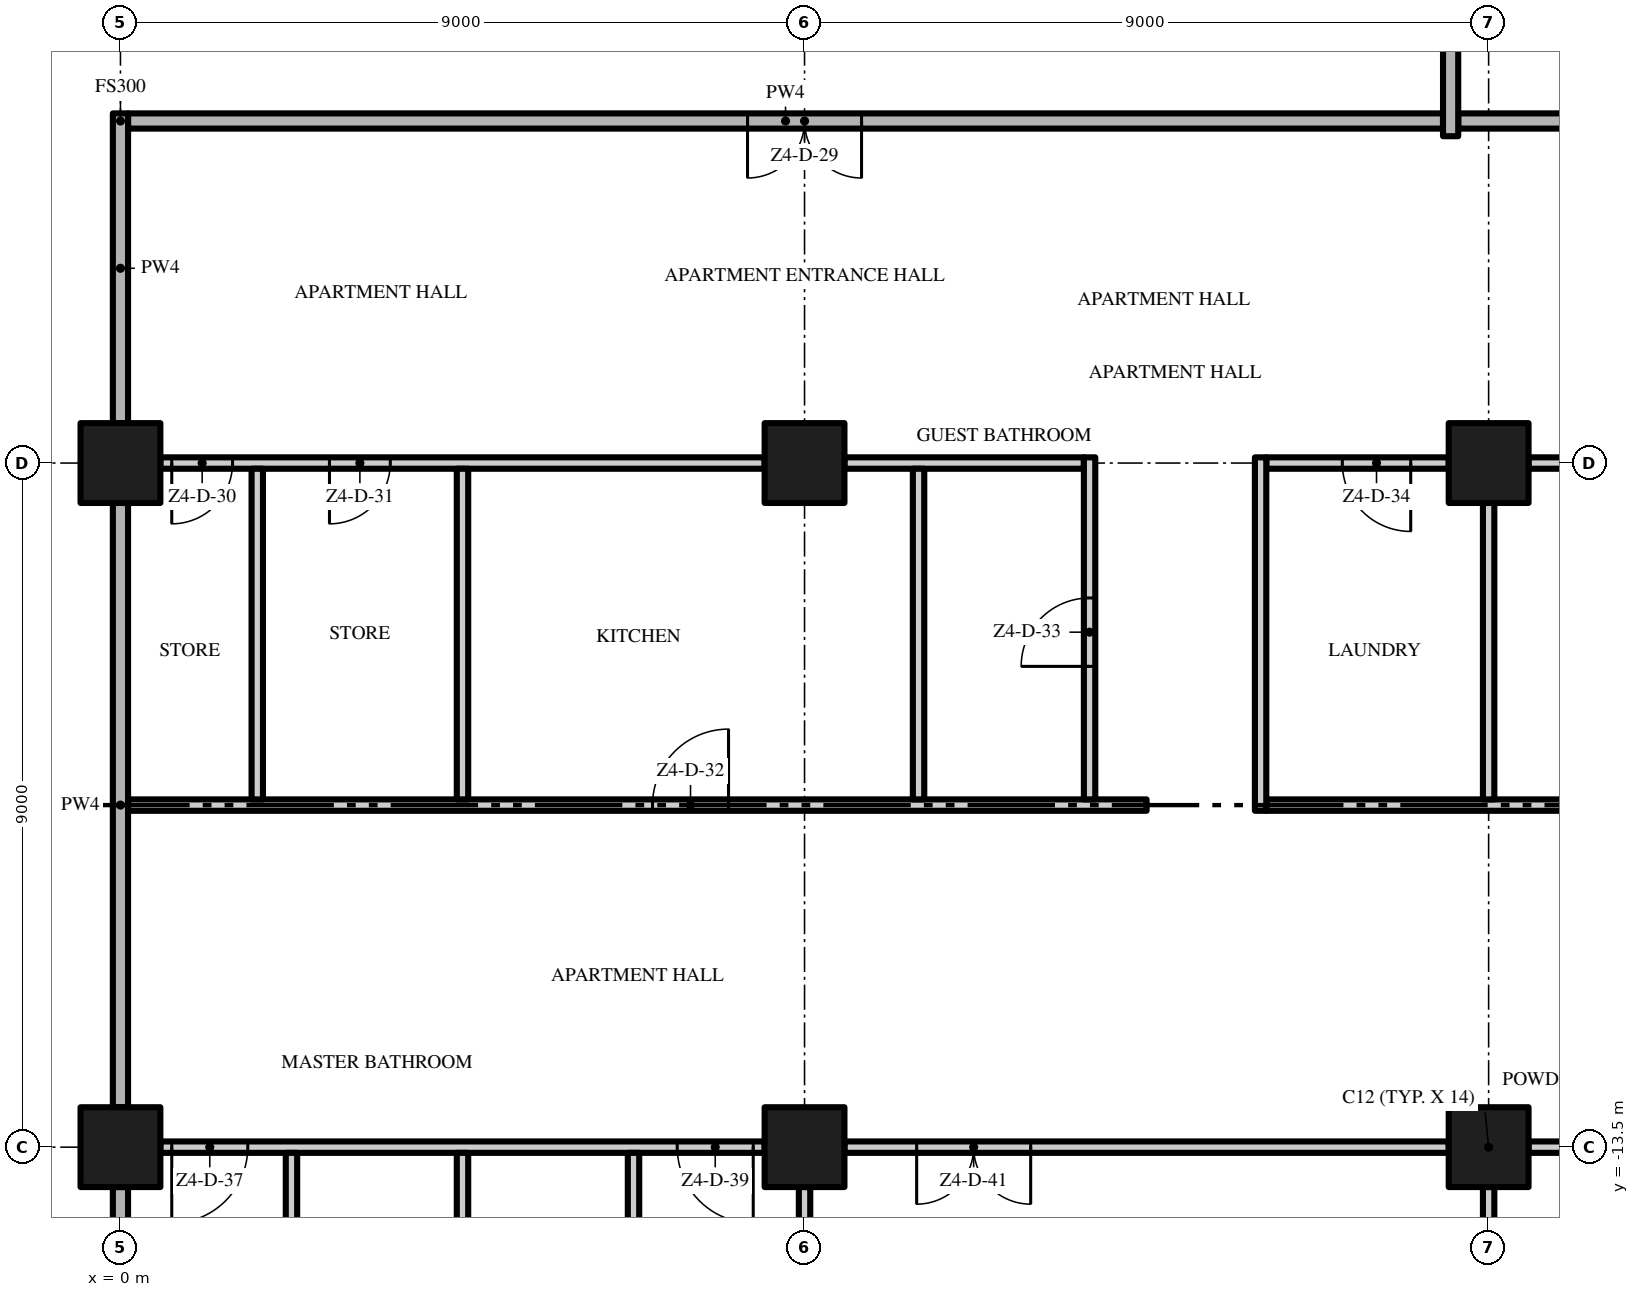
"""IFC4 building model, lengths in metres.
Left out: names, types, materials, properties, quantities, classifications, styles, units other than length and angle.
Written with IfcOpenShell. Run it as: python <this file> out.ifc"""

import sys

from ifc_helpers import new_model, si_unit, direction, frame, frame_2d, origin, origin_2d, place, context, subcontext, project, spatial, rectangle, extrude, element, fill, save


model = new_model("IFC4")
c1 = context("Model", 3, precision=1e-05, world=origin(), true_north=direction((0.0, 1.0)))
c2 = subcontext(c1, "Body", "Model", "MODEL_VIEW")
j1 = project(units=[si_unit("LENGTHUNIT", "METRE"), si_unit("PLANEANGLEUNIT", "RADIAN")], contexts=[c1])
p1 = place(None, origin())
s1 = spatial("IfcSite", under=j1, at=p1, CompositionType="ELEMENT")
p2 = place(p1, origin())
s2 = spatial("IfcBuilding", under=s1, at=p2, CompositionType="ELEMENT")
p3 = place(p2, frame((0.0, 0.0, 222.4)))
s3 = spatial("IfcBuildingStorey", under=s2, at=p3, CompositionType="ELEMENT", Elevation=222.4)
for number, where, z_axis, x_axis in (
    (1, (0.0, -13.5, 0.0), (0.0, 0.0, 1.0), (1.0, 0.0, 0.0)),
    (2, (0.0, -4.5, 0.0), (0.0, 0.0, 1.0), (1.0, 0.0, 0.0)),
    (3, (18.0, -13.5, 0.0), (0.0, 0.0, 1.0), (1.0, 0.0, 0.0)),
    (4, (18.0, -4.5, 0.0), (0.0, 0.0, 1.0), (1.0, 0.0, 0.0)),
    (5, (9.0, -13.5, 0.0), (0.0, 0.0, 1.0), (1.0, 0.0, 0.0)),
    (6, (9.0, -4.5, 0.0), (0.0, 0.0, 1.0), (1.0, 0.0, 0.0)),
):
    element("IfcColumn", number, at=place(p3, frame(where, z_axis=z_axis, x_axis=x_axis)), inside=s3, PredefinedType="COLUMN", context=c2, shape_type="SweptSolid", body=[
        extrude(rectangle(XDim=1.05, YDim=1.05, at=origin_2d()), origin(), (0.0, 0.0, 1.0), 3.5),
    ])
p4 = place(p3, frame((8.475, -13.5, 0.0), z_axis=(0.0, 0.0, 1.0), x_axis=(-1.0, 0.0, 0.0)))
e7 = element("IfcWall", 7, at=p4, inside=s3, PredefinedType="PARTITIONING", context=c2, shape_type="SweptSolid", body=[
    extrude(rectangle(XDim=7.95, YDim=0.15, at=frame_2d((3.975, 0.0))), origin(), (0.0, 0.0, 1.0), 3.5),
])
p5 = place(p4, frame((6.8, 0.0, 0.0)))
e8 = element("IfcOpeningElement", 8, at=p5, cuts=e7, PredefinedType="OPENING", context=c2, shape_type="SweptSolid", body=[
    extrude(rectangle(XDim=1.0, YDim=2.4, at=frame_2d((0.5, 1.2))), frame((0.0, 0.085, 0.0), z_axis=(0.0, -1.0, 0.0), x_axis=(1.0, 0.0, 0.0)), (0.0, 0.0, 1.0), 0.17),
])
p6 = place(p4, frame((0.15, 0.0, 0.0)))
e9 = element("IfcOpeningElement", 9, at=p6, cuts=e7, PredefinedType="OPENING", context=c2, shape_type="SweptSolid", body=[
    extrude(rectangle(XDim=1.0, YDim=2.4, at=frame_2d((0.5, 1.2))), frame((0.0, 0.085, 0.0), z_axis=(0.0, -1.0, 0.0), x_axis=(1.0, 0.0, 0.0)), (0.0, 0.0, 1.0), 0.17),
])
p7 = place(p3, frame((17.475, -13.5, 0.0), z_axis=(0.0, 0.0, 1.0), x_axis=(-1.0, 0.0, 0.0)))
e10 = element("IfcWall", 10, at=p7, inside=s3, PredefinedType="PARTITIONING", context=c2, shape_type="SweptSolid", body=[
    extrude(rectangle(XDim=7.95, YDim=0.15, at=frame_2d((3.975, 0.0))), origin(), (0.0, 0.0, 1.0), 3.5),
])
p8 = place(p7, frame((5.5, 0.0, 0.0)))
e11 = element("IfcOpeningElement", 11, at=p8, cuts=e10, PredefinedType="OPENING", context=c2, shape_type="SweptSolid", body=[
    extrude(rectangle(XDim=1.5, YDim=2.4, at=frame_2d((0.75, 1.2))), frame((0.0, 0.085, 0.0), z_axis=(0.0, -1.0, 0.0), x_axis=(1.0, 0.0, 0.0)), (0.0, 0.0, 1.0), 0.17),
])
p9 = place(p3, frame((26.05, -13.5, 0.0), z_axis=(0.0, 0.0, 1.0), x_axis=(-1.0, 0.0, 0.0)))
e12 = element("IfcWall", 12, at=p9, inside=s3, PredefinedType="PARTITIONING", context=c2, shape_type="SweptSolid", body=[
    extrude(rectangle(XDim=7.525, YDim=0.15, at=frame_2d((3.763, 0.0))), origin(), (0.0, 0.0, 1.0), 3.5),
])
p10 = place(p9, frame((1.55, 0.0, 0.0)))
e13 = element("IfcOpeningElement", 13, at=p10, cuts=e12, PredefinedType="OPENING", context=c2, shape_type="SweptSolid", body=[
    extrude(rectangle(XDim=1.8, YDim=2.4, at=frame_2d((0.9, 1.2))), frame((0.0, 0.085, 0.0), z_axis=(0.0, -1.0, 0.0), x_axis=(1.0, 0.0, 0.0)), (0.0, 0.0, 1.0), 0.17),
])
p11 = place(p3, frame((0.1, -9.0, 0.0), z_axis=(0.0, 0.0, 1.0), x_axis=(1.0, 0.0, 0.0)))
e14 = element("IfcWall", 14, at=p11, inside=s3, PredefinedType="PARTITIONING", context=c2, shape_type="SweptSolid", body=[
    extrude(rectangle(XDim=13.4, YDim=0.15, at=frame_2d((6.7, 0.0))), origin(), (0.0, 0.0, 1.0), 3.5),
])
p12 = place(p11, frame((6.9, 0.0, 0.0)))
e15 = element("IfcOpeningElement", 15, at=p12, cuts=e14, PredefinedType="OPENING", context=c2, shape_type="SweptSolid", body=[
    extrude(rectangle(XDim=1.0, YDim=2.4, at=frame_2d((0.5, 1.2))), frame((0.0, 0.085, 0.0), z_axis=(0.0, -1.0, 0.0), x_axis=(1.0, 0.0, 0.0)), (0.0, 0.0, 1.0), 0.17),
])
p13 = place(p3, frame((15.075, -9.0, 0.0), z_axis=(0.0, 0.0, 1.0), x_axis=(1.0, 0.0, 0.0)))
e16 = element("IfcWall", 16, at=p13, inside=s3, PredefinedType="PARTITIONING", context=c2, shape_type="SweptSolid", body=[
    extrude(rectangle(XDim=11.625, YDim=0.15, at=frame_2d((5.812, 0.0))), origin(), (0.0, 0.0, 1.0), 3.5),
])
p14 = place(p3, frame((8.475, -4.5, 0.0), z_axis=(0.0, 0.0, 1.0), x_axis=(-1.0, 0.0, 0.0)))
e17 = element("IfcWall", 17, at=p14, inside=s3, PredefinedType="PARTITIONING", context=c2, shape_type="SweptSolid", body=[
    extrude(rectangle(XDim=7.95, YDim=0.15, at=frame_2d((3.975, 0.0))), origin(), (0.0, 0.0, 1.0), 3.5),
])
p15 = place(p14, frame((7.0, 0.0, 0.0)))
e18 = element("IfcOpeningElement", 18, at=p15, cuts=e17, PredefinedType="OPENING", context=c2, shape_type="SweptSolid", body=[
    extrude(rectangle(XDim=0.8, YDim=2.0, at=frame_2d((0.4, 1.0))), frame((0.0, 0.085, 0.0), z_axis=(0.0, -1.0, 0.0), x_axis=(1.0, 0.0, 0.0)), (0.0, 0.0, 1.0), 0.17),
])
p16 = place(p14, frame((4.925, 0.0, 0.0)))
e19 = element("IfcOpeningElement", 19, at=p16, cuts=e17, PredefinedType="OPENING", context=c2, shape_type="SweptSolid", body=[
    extrude(rectangle(XDim=0.8, YDim=2.0, at=frame_2d((0.4, 1.0))), frame((0.0, 0.085, 0.0), z_axis=(0.0, -1.0, 0.0), x_axis=(1.0, 0.0, 0.0)), (0.0, 0.0, 1.0), 0.17),
])
p17 = place(p3, frame((9.525, -4.5, 0.0), z_axis=(0.0, 0.0, 1.0), x_axis=(1.0, 0.0, 0.0)))
e20 = element("IfcWall", 20, at=p17, inside=s3, PredefinedType="PARTITIONING", context=c2, shape_type="SweptSolid", body=[
    extrude(rectangle(XDim=3.15, YDim=0.15, at=frame_2d((1.575, 0.0))), origin(), (0.0, 0.0, 1.0), 3.5),
])
p18 = place(p3, frame((17.475, -4.5, 0.0), z_axis=(0.0, 0.0, 1.0), x_axis=(-1.0, 0.0, 0.0)))
e21 = element("IfcWall", 21, at=p18, inside=s3, PredefinedType="PARTITIONING", context=c2, shape_type="SweptSolid", body=[
    extrude(rectangle(XDim=2.4, YDim=0.15, at=frame_2d((1.2, 0.0))), origin(), (0.0, 0.0, 1.0), 3.5),
])
p19 = place(p18, frame((0.5, 0.0, 0.0)))
e22 = element("IfcOpeningElement", 22, at=p19, cuts=e21, PredefinedType="OPENING", context=c2, shape_type="SweptSolid", body=[
    extrude(rectangle(XDim=0.9, YDim=2.1, at=frame_2d((0.45, 1.05))), frame((0.0, 0.085, 0.0), z_axis=(0.0, -1.0, 0.0), x_axis=(1.0, 0.0, 0.0)), (0.0, 0.0, 1.0), 0.17),
])
p20 = place(p3, frame((26.05, -4.5, 0.0), z_axis=(0.0, 0.0, 1.0), x_axis=(-1.0, 0.0, 0.0)))
e23 = element("IfcWall", 23, at=p20, inside=s3, PredefinedType="PARTITIONING", context=c2, shape_type="SweptSolid", body=[
    extrude(rectangle(XDim=7.525, YDim=0.15, at=frame_2d((3.763, 0.0))), origin(), (0.0, 0.0, 1.0), 3.5),
])
p21 = place(p20, frame((4.975, 0.0, 0.0)))
e24 = element("IfcOpeningElement", 24, at=p21, cuts=e23, PredefinedType="OPENING", context=c2, shape_type="SweptSolid", body=[
    extrude(rectangle(XDim=0.9, YDim=2.1, at=frame_2d((0.45, 1.05))), frame((0.0, 0.085, 0.0), z_axis=(0.0, -1.0, 0.0), x_axis=(1.0, 0.0, 0.0)), (0.0, 0.0, 1.0), 0.17),
])
p22 = place(p3, frame((17.4, 0.0, 0.0), z_axis=(0.0, 0.0, 1.0), x_axis=(-1.0, 0.0, 0.0)))
e25 = element("IfcWall", 25, at=p22, inside=s3, PredefinedType="PARTITIONING", context=c2, shape_type="SweptSolid", body=[
    extrude(rectangle(XDim=17.3, YDim=0.2, at=frame_2d((8.65, 0.0))), origin(), (0.0, 0.0, 1.0), 3.5),
])
p23 = place(p22, frame((7.65, 0.0, 0.0)))
e26 = element("IfcOpeningElement", 26, at=p23, cuts=e25, PredefinedType="OPENING", context=c2, shape_type="SweptSolid", body=[
    extrude(rectangle(XDim=1.5, YDim=2.4, at=frame_2d((0.75, 1.2))), frame((0.0, 0.11, 0.0), z_axis=(0.0, -1.0, 0.0), x_axis=(1.0, 0.0, 0.0)), (0.0, 0.0, 1.0), 0.22),
])
p24 = place(p3, frame((17.6, 0.0, 0.0), z_axis=(0.0, 0.0, 1.0), x_axis=(1.0, 0.0, 0.0)))
e27 = element("IfcWall", 27, at=p24, inside=s3, PredefinedType="PARTITIONING", context=c2, shape_type="SweptSolid", body=[
    extrude(rectangle(XDim=9.1, YDim=0.2, at=frame_2d((4.55, 0.0))), origin(), (0.0, 0.0, 1.0), 3.5),
])
p25 = place(p3, frame((0.0, -21.55, 0.0), z_axis=(0.0, 0.0, 1.0), x_axis=(0.0, 1.0, 0.0)))
e28 = element("IfcWall", 28, at=p25, inside=s3, PredefinedType="PARTITIONING", context=c2, shape_type="SweptSolid", body=[
    extrude(rectangle(XDim=7.525, YDim=0.2, at=frame_2d((3.763, 0.0))), origin(), (0.0, 0.0, 1.0), 3.5),
])
p26 = place(p3, frame((0.0, -12.975, 0.0), z_axis=(0.0, 0.0, 1.0), x_axis=(0.0, 1.0, 0.0)))
e29 = element("IfcWall", 29, at=p26, inside=s3, PredefinedType="PARTITIONING", context=c2, shape_type="SweptSolid", body=[
    extrude(rectangle(XDim=7.95, YDim=0.2, at=frame_2d((3.975, 0.0))), origin(), (0.0, 0.0, 1.0), 3.5),
])
p27 = place(p3, frame((0.0, -3.975, 0.0), z_axis=(0.0, 0.0, 1.0), x_axis=(0.0, 1.0, 0.0)))
e30 = element("IfcWall", 30, at=p27, inside=s3, PredefinedType="PARTITIONING", context=c2, shape_type="SweptSolid", body=[
    extrude(rectangle(XDim=4.075, YDim=0.2, at=frame_2d((2.038, 0.0))), origin(), (0.0, 0.0, 1.0), 3.5),
])
p28 = place(p3, frame((1.8, -8.925, 0.0), z_axis=(0.0, 0.0, 1.0), x_axis=(0.0, 1.0, 0.0)))
e31 = element("IfcWall", 31, at=p28, inside=s3, PredefinedType="PARTITIONING", context=c2, shape_type="SweptSolid", body=[
    extrude(rectangle(XDim=4.35, YDim=0.15, at=frame_2d((2.175, 0.0))), origin(), (0.0, 0.0, 1.0), 3.5),
])
p29 = place(p3, frame((2.25, -16.575, 0.0), z_axis=(0.0, 0.0, 1.0), x_axis=(0.0, 1.0, 0.0)))
e32 = element("IfcWall", 32, at=p29, inside=s3, PredefinedType="PARTITIONING", context=c2, shape_type="SweptSolid", body=[
    extrude(rectangle(XDim=3.0, YDim=0.15, at=frame_2d((1.5, 0.0))), origin(), (0.0, 0.0, 1.0), 3.5),
])
p30 = place(p3, frame((4.5, -22.2, 0.0), z_axis=(0.0, 0.0, 1.0), x_axis=(0.0, 1.0, 0.0)))
e33 = element("IfcWall", 33, at=p30, inside=s3, PredefinedType="PARTITIONING", context=c2, shape_type="SweptSolid", body=[
    extrude(rectangle(XDim=8.625, YDim=0.15, at=frame_2d((4.312, 0.0))), origin(), (0.0, 0.0, 1.0), 3.5),
])
p31 = place(p3, frame((4.5, -8.925, 0.0), z_axis=(0.0, 0.0, 1.0), x_axis=(0.0, 1.0, 0.0)))
e34 = element("IfcWall", 34, at=p31, inside=s3, PredefinedType="PARTITIONING", context=c2, shape_type="SweptSolid", body=[
    extrude(rectangle(XDim=4.35, YDim=0.15, at=frame_2d((2.175, 0.0))), origin(), (0.0, 0.0, 1.0), 3.5),
])
p32 = place(p3, frame((6.75, -16.575, 0.0), z_axis=(0.0, 0.0, 1.0), x_axis=(0.0, 1.0, 0.0)))
e35 = element("IfcWall", 35, at=p32, inside=s3, PredefinedType="PARTITIONING", context=c2, shape_type="SweptSolid", body=[
    extrude(rectangle(XDim=3.0, YDim=0.15, at=frame_2d((1.5, 0.0))), origin(), (0.0, 0.0, 1.0), 3.5),
])
p33 = place(p3, frame((9.0, -21.55, 0.0), z_axis=(0.0, 0.0, 1.0), x_axis=(0.0, 1.0, 0.0)))
e36 = element("IfcWall", 36, at=p33, inside=s3, PredefinedType="PARTITIONING", context=c2, shape_type="SweptSolid", body=[
    extrude(rectangle(XDim=7.525, YDim=0.15, at=frame_2d((3.763, 0.0))), origin(), (0.0, 0.0, 1.0), 3.5),
])
p34 = place(p3, frame((10.5, -8.925, 0.0), z_axis=(0.0, 0.0, 1.0), x_axis=(0.0, 1.0, 0.0)))
e37 = element("IfcWall", 37, at=p34, inside=s3, PredefinedType="PARTITIONING", context=c2, shape_type="SweptSolid", body=[
    extrude(rectangle(XDim=4.35, YDim=0.15, at=frame_2d((2.175, 0.0))), origin(), (0.0, 0.0, 1.0), 3.5),
])
p35 = place(p3, frame((12.75, -8.925, 0.0), z_axis=(0.0, 0.0, 1.0), x_axis=(0.0, 1.0, 0.0)))
e38 = element("IfcWall", 38, at=p35, inside=s3, PredefinedType="PARTITIONING", context=c2, shape_type="SweptSolid", body=[
    extrude(rectangle(XDim=4.5, YDim=0.15, at=frame_2d((2.25, 0.0))), origin(), (0.0, 0.0, 1.0), 3.5),
])
p36 = place(p35, frame((1.75, 0.0, 0.0)))
e39 = element("IfcOpeningElement", 39, at=p36, cuts=e38, PredefinedType="OPENING", context=c2, shape_type="SweptSolid", body=[
    extrude(rectangle(XDim=0.9, YDim=2.1, at=frame_2d((0.45, 1.05))), frame((0.0, 0.085, 0.0), z_axis=(0.0, -1.0, 0.0), x_axis=(1.0, 0.0, 0.0)), (0.0, 0.0, 1.0), 0.17),
])
p37 = place(p3, frame((15.0, -9.075, 0.0), z_axis=(0.0, 0.0, 1.0), x_axis=(0.0, 1.0, 0.0)))
e40 = element("IfcWall", 40, at=p37, inside=s3, PredefinedType="PARTITIONING", context=c2, shape_type="SweptSolid", body=[
    extrude(rectangle(XDim=4.65, YDim=0.15, at=frame_2d((2.325, 0.0))), origin(), (0.0, 0.0, 1.0), 3.5),
])
p38 = place(p3, frame((17.5, -0.2, 0.0), z_axis=(0.0, 0.0, 1.0), x_axis=(0.0, 1.0, 0.0)))
e41 = element("IfcWall", 41, at=p38, inside=s3, PredefinedType="PARTITIONING", context=c2, shape_type="SweptSolid", body=[
    extrude(rectangle(XDim=4.175, YDim=0.2, at=frame_2d((2.087, 0.0))), origin(), (0.0, 0.0, 1.0), 3.5),
])
p39 = place(p3, frame((18.0, -21.55, 0.0), z_axis=(0.0, 0.0, 1.0), x_axis=(0.0, 1.0, 0.0)))
e42 = element("IfcWall", 42, at=p39, inside=s3, PredefinedType="PARTITIONING", context=c2, shape_type="SweptSolid", body=[
    extrude(rectangle(XDim=7.525, YDim=0.15, at=frame_2d((3.763, 0.0))), origin(), (0.0, 0.0, 1.0), 3.5),
])
p40 = place(p3, frame((18.0, -8.925, 0.0), z_axis=(0.0, 0.0, 1.0), x_axis=(0.0, 1.0, 0.0)))
e43 = element("IfcWall", 43, at=p40, inside=s3, PredefinedType="PARTITIONING", context=c2, shape_type="SweptSolid", body=[
    extrude(rectangle(XDim=3.9, YDim=0.15, at=frame_2d((1.95, 0.0))), origin(), (0.0, 0.0, 1.0), 3.5),
])
p41 = place(p23, origin())
e44 = element("IfcDoor", 44, at=p41, inside=s3, OperationType="DOUBLE_DOOR_SINGLE_SWING", PredefinedType="DOOR", context=c2, shape_type="SweptSolid", body=[
    extrude(rectangle(XDim=1.5, YDim=2.4, at=frame_2d((0.75, 1.2))), frame((0.0, 0.025, 0.0), z_axis=(0.0, -1.0, 0.0), x_axis=(1.0, 0.0, 0.0)), (0.0, 0.0, 1.0), 0.05),
])
fill(e26, e44)
p42 = place(p15, origin())
e45 = element("IfcDoor", 45, at=p42, inside=s3, OperationType="SINGLE_SWING_RIGHT", PredefinedType="DOOR", context=c2, shape_type="SweptSolid", body=[
    extrude(rectangle(XDim=0.8, YDim=2.0, at=frame_2d((0.4, 1.0))), frame((0.0, 0.025, 0.0), z_axis=(0.0, -1.0, 0.0), x_axis=(1.0, 0.0, 0.0)), (0.0, 0.0, 1.0), 0.05),
])
fill(e18, e45)
p43 = place(p16, origin())
e46 = element("IfcDoor", 46, at=p43, inside=s3, OperationType="SINGLE_SWING_RIGHT", PredefinedType="DOOR", context=c2, shape_type="SweptSolid", body=[
    extrude(rectangle(XDim=0.8, YDim=2.0, at=frame_2d((0.4, 1.0))), frame((0.0, 0.025, 0.0), z_axis=(0.0, -1.0, 0.0), x_axis=(1.0, 0.0, 0.0)), (0.0, 0.0, 1.0), 0.05),
])
fill(e19, e46)
p44 = place(p12, origin())
e47 = element("IfcDoor", 47, at=p44, inside=s3, OperationType="SINGLE_SWING_RIGHT", PredefinedType="DOOR", context=c2, shape_type="SweptSolid", body=[
    extrude(rectangle(XDim=1.0, YDim=2.4, at=frame_2d((0.5, 1.2))), frame((0.0, 0.025, 0.0), z_axis=(0.0, -1.0, 0.0), x_axis=(1.0, 0.0, 0.0)), (0.0, 0.0, 1.0), 0.05),
])
fill(e15, e47)
p45 = place(p36, origin())
e48 = element("IfcDoor", 48, at=p45, inside=s3, OperationType="SINGLE_SWING_LEFT", PredefinedType="DOOR", context=c2, shape_type="SweptSolid", body=[
    extrude(rectangle(XDim=0.9, YDim=2.1, at=frame_2d((0.45, 1.05))), frame((0.0, 0.025, 0.0), z_axis=(0.0, -1.0, 0.0), x_axis=(1.0, 0.0, 0.0)), (0.0, 0.0, 1.0), 0.05),
])
fill(e39, e48)
p46 = place(p19, origin())
e49 = element("IfcDoor", 49, at=p46, inside=s3, OperationType="SINGLE_SWING_LEFT", PredefinedType="DOOR", context=c2, shape_type="SweptSolid", body=[
    extrude(rectangle(XDim=0.9, YDim=2.1, at=frame_2d((0.45, 1.05))), frame((0.0, 0.025, 0.0), z_axis=(0.0, -1.0, 0.0), x_axis=(1.0, 0.0, 0.0)), (0.0, 0.0, 1.0), 0.05),
])
fill(e22, e49)
p47 = place(p5, origin())
e50 = element("IfcDoor", 50, at=p47, inside=s3, OperationType="SINGLE_SWING_RIGHT", PredefinedType="DOOR", context=c2, shape_type="SweptSolid", body=[
    extrude(rectangle(XDim=1.0, YDim=2.4, at=frame_2d((0.5, 1.2))), frame((0.0, 0.025, 0.0), z_axis=(0.0, -1.0, 0.0), x_axis=(1.0, 0.0, 0.0)), (0.0, 0.0, 1.0), 0.05),
])
fill(e8, e50)
p48 = place(p6, origin())
e51 = element("IfcDoor", 51, at=p48, inside=s3, OperationType="SINGLE_SWING_LEFT", PredefinedType="DOOR", context=c2, shape_type="SweptSolid", body=[
    extrude(rectangle(XDim=1.0, YDim=2.4, at=frame_2d((0.5, 1.2))), frame((0.0, 0.025, 0.0), z_axis=(0.0, -1.0, 0.0), x_axis=(1.0, 0.0, 0.0)), (0.0, 0.0, 1.0), 0.05),
])
fill(e9, e51)
p49 = place(p8, origin())
e52 = element("IfcDoor", 52, at=p49, inside=s3, OperationType="DOUBLE_DOOR_SINGLE_SWING", PredefinedType="DOOR", context=c2, shape_type="SweptSolid", body=[
    extrude(rectangle(XDim=1.5, YDim=2.4, at=frame_2d((0.75, 1.2))), frame((0.0, 0.025, 0.0), z_axis=(0.0, -1.0, 0.0), x_axis=(1.0, 0.0, 0.0)), (0.0, 0.0, 1.0), 0.05),
])
fill(e11, e52)
save(model, sys.argv[1])
